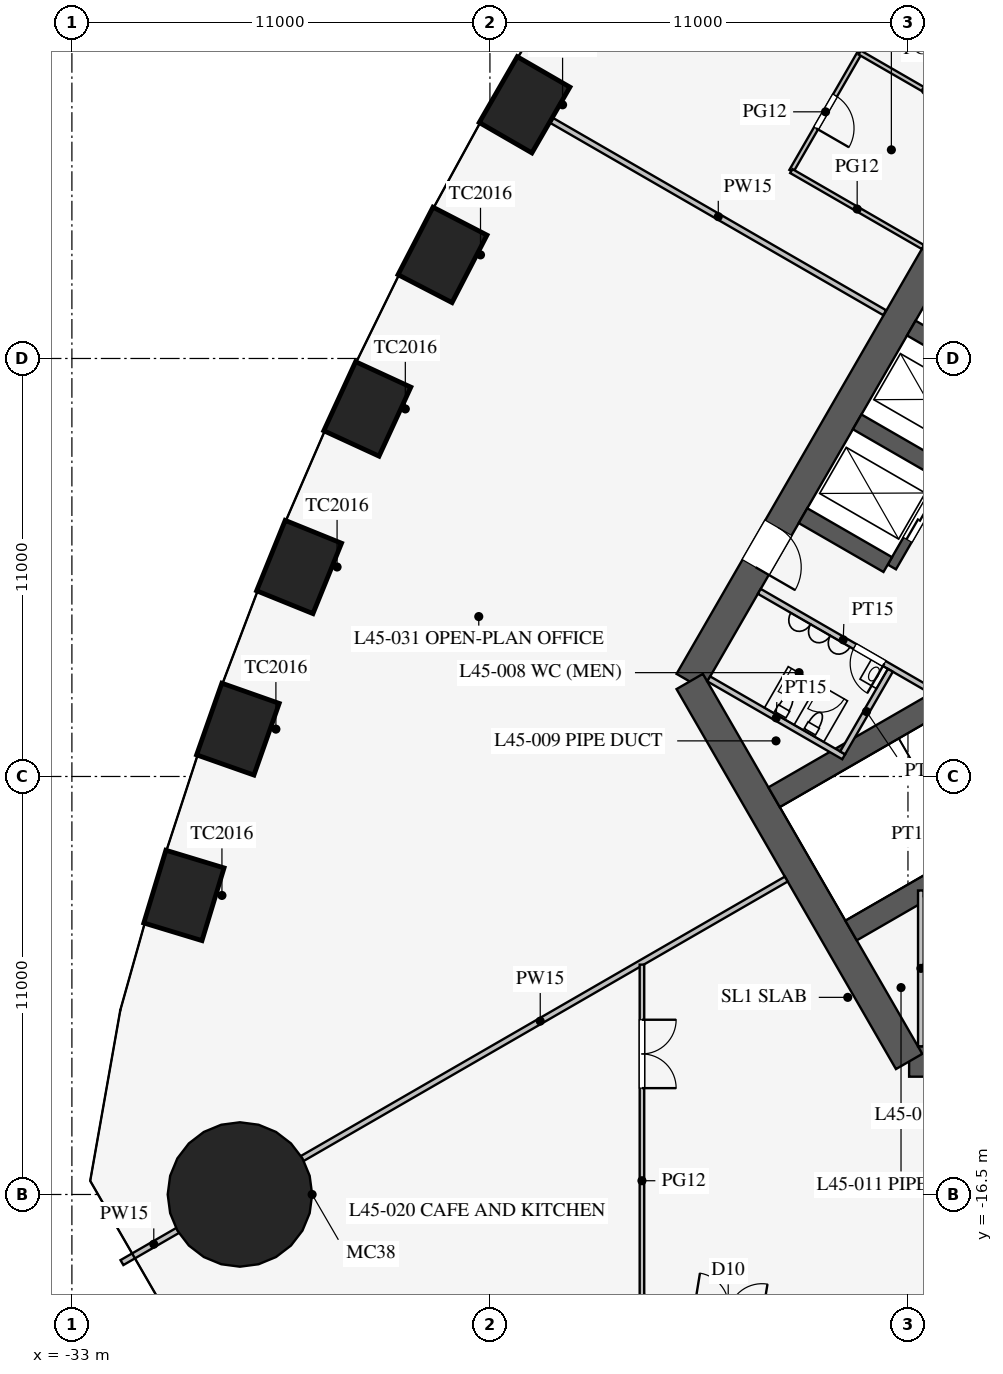
"""IFC4 building model, lengths in metres.
Left out: names, types, materials, properties, quantities, classifications, styles, units other than length and angle.
Written with IfcOpenShell. Run it as: python <this file> out.ifc"""

import sys

from ifc_helpers import new_model, si_unit, direction, frame, frame_2d, origin, origin_2d, place, context, subcontext, project, spatial, rectangle, circle, extrude, element, fill, save


model = new_model("IFC4")
c1 = context("Model", 3, precision=1e-05, world=origin(), true_north=direction((0.0, 1.0)))
c2 = subcontext(c1, "Body", "Model", "MODEL_VIEW")
j1 = project(units=[si_unit("LENGTHUNIT", "METRE"), si_unit("PLANEANGLEUNIT", "RADIAN")], contexts=[c1])
p1 = place(None, origin())
s1 = spatial("IfcSite", under=j1, at=p1, CompositionType="ELEMENT")
p2 = place(p1, origin())
s2 = spatial("IfcBuilding", under=s1, at=p2, CompositionType="ELEMENT")
p3 = place(p2, frame((0.0, 0.0, 198.1)))
s3 = spatial("IfcBuildingStorey", under=s2, at=p3, CompositionType="ELEMENT", Elevation=198.1)
for number, where, z_axis, x_axis in (
    (1, (-21.088, 12.175, 0.0), (0.0, 0.0, 1.0), (-0.5, -0.866, 0.0)),
    (2, (-23.248, 8.226, 0.0), (0.0, 0.0, 1.0), (-0.46, -0.888, 0.0)),
    (3, (-25.227, 4.172, 0.0), (0.0, 0.0, 1.0), (-0.418, -0.908, 0.0)),
    (4, (-27.022, 0.013, 0.0), (0.0, 0.0, 1.0), (-0.376, -0.927, 0.0)),
    (5, (-28.632, -4.254, 0.0), (0.0, 0.0, 1.0), (-0.332, -0.943, 0.0)),
    (6, (-30.052, -8.63, 0.0), (0.0, 0.0, 1.0), (-0.29, -0.957, 0.0)),
):
    element("IfcColumn", number, at=place(p3, frame(where, z_axis=z_axis, x_axis=x_axis)), inside=s3, PredefinedType="COLUMN", context=c2, shape_type="SweptSolid", body=[
        extrude(rectangle(XDim=2.0, YDim=1.6, at=origin_2d()), origin(), (0.0, 0.0, 1.0), 4.2),
    ])
p4 = place(p3, frame((-28.579, -16.5, 0.0), z_axis=(0.0, 0.0, 1.0), x_axis=(1.0, 0.0, 0.0)))
e7 = element("IfcColumn", 7, at=p4, inside=s3, PredefinedType="COLUMN", context=c2, shape_type="SweptSolid", body=[
    extrude(circle(Radius=1.9, at=origin_2d()), origin(), (0.0, 0.0, 1.0), 4.2),
])
p5 = place(p3, frame((-10.97, -13.0, 0.0), z_axis=(0.0, 0.0, 1.0), x_axis=(1.0, 0.0, 0.0)))
e8 = element("IfcWall", 8, at=p5, inside=s3, PredefinedType="SHEAR", context=c2, shape_type="SweptSolid", body=[
    extrude(rectangle(XDim=21.939, YDim=0.8, at=frame_2d((10.97, 0.0))), origin(), (0.0, 0.0, 1.0), 4.2),
])
p6 = place(p5, frame((17.27, 0.0, 0.0)))
e9 = element("IfcOpeningElement", 9, at=p6, cuts=e8, PredefinedType="OPENING", context=c2, shape_type="SweptSolid", body=[
    extrude(rectangle(XDim=1.2, YDim=2.1, at=frame_2d((0.6, 1.05))), frame((0.0, 0.41, 0.0), z_axis=(0.0, -1.0, 0.0), x_axis=(1.0, 0.0, 0.0)), (0.0, 0.0, 1.0), 0.82),
])
p7 = place(p5, frame((3.47, 0.0, 0.0)))
e10 = element("IfcOpeningElement", 10, at=p7, cuts=e8, PredefinedType="OPENING", context=c2, shape_type="SweptSolid", body=[
    extrude(rectangle(XDim=1.2, YDim=2.1, at=frame_2d((0.6, 1.05))), frame((0.0, 0.41, 0.0), z_axis=(0.0, -1.0, 0.0), x_axis=(1.0, 0.0, 0.0)), (0.0, 0.0, 1.0), 0.82),
])
p8 = place(p3, frame((-5.773, 16.0, 0.0), z_axis=(0.0, 0.0, 1.0), x_axis=(-0.500002442456, -0.866023993627, 0.0)))
e11 = element("IfcWall", 11, at=p8, inside=s3, PredefinedType="SHEAR", context=c2, shape_type="SweptSolid", body=[
    extrude(rectangle(XDim=21.939, YDim=0.8, at=frame_2d((10.97, 0.0))), origin(), (0.0, 0.0, 1.0), 4.2),
])
p9 = place(p8, frame((17.27, 0.0, 0.0)))
e12 = element("IfcOpeningElement", 12, at=p9, cuts=e11, PredefinedType="OPENING", context=c2, shape_type="SweptSolid", body=[
    extrude(rectangle(XDim=1.2, YDim=2.1, at=frame_2d((0.6, 1.05))), frame((0.0, 0.41, 0.0), z_axis=(0.0, -1.0, 0.0), x_axis=(1.0, 0.0, 0.0)), (0.0, 0.0, 1.0), 0.82),
])
p10 = place(p8, frame((3.47, 0.0, 0.0)))
e13 = element("IfcOpeningElement", 13, at=p10, cuts=e11, PredefinedType="OPENING", context=c2, shape_type="SweptSolid", body=[
    extrude(rectangle(XDim=1.2, YDim=2.1, at=frame_2d((0.6, 1.05))), frame((0.0, 0.41, 0.0), z_axis=(0.0, -1.0, 0.0), x_axis=(1.0, 0.0, 0.0)), (0.0, 0.0, 1.0), 0.82),
])
p11 = place(p3, frame((-16.743, -3.0, 0.0), z_axis=(0.0, 0.0, 1.0), x_axis=(0.499995765644, -0.866027848477, 0.0)))
e14 = element("IfcWall", 14, at=p11, inside=s3, PredefinedType="SHEAR", context=c2, shape_type="SweptSolid", body=[
    extrude(rectangle(XDim=11.547, YDim=0.8, at=frame_2d((5.773, 0.0))), origin(), (0.0, 0.0, 1.0), 4.2),
])
p12 = place(p3, frame((-5.724, 9.886, 0.0), z_axis=(0.0, 0.0, 1.0), x_axis=(-0.500001763848, -0.866024385424, 0.0)))
e15 = element("IfcWall", 15, at=p12, inside=s3, PredefinedType="SHEAR", context=c2, shape_type="SweptSolid", body=[
    extrude(rectangle(XDim=11.4, YDim=0.25, at=frame_2d((5.7, 0.0))), origin(), (0.0, 0.0, 1.0), 4.2),
])
p13 = place(p12, frame((6.525, 0.0, 0.0)))
e16 = element("IfcOpeningElement", 16, at=p13, cuts=e15, PredefinedType="OPENING", context=c2, shape_type="SweptSolid", body=[
    extrude(rectangle(XDim=1.2, YDim=2.2, at=frame_2d((0.6, 1.1))), frame((0.0, 0.135, 0.0), z_axis=(0.0, -1.0, 0.0), x_axis=(1.0, 0.0, 0.0)), (0.0, 0.0, 1.0), 0.27),
])
p14 = place(p12, frame((9.375, 0.0, 0.0)))
e17 = element("IfcOpeningElement", 17, at=p14, cuts=e15, PredefinedType="OPENING", context=c2, shape_type="SweptSolid", body=[
    extrude(rectangle(XDim=1.2, YDim=2.2, at=frame_2d((0.6, 1.1))), frame((0.0, 0.135, 0.0), z_axis=(0.0, -1.0, 0.0), x_axis=(1.0, 0.0, 0.0)), (0.0, 0.0, 1.0), 0.27),
])
for number, where, z_axis, x_axis in (
    (18, (-8.682, 5.012, 0.0), (0.0, 0.0, 1.0), (-0.866, 0.5, 0.0)),
    (19, (-10.107, 2.544, 0.0), (0.0, 0.0, 1.0), (-0.866, 0.5, 0.0)),
    (20, (-11.532, 0.076, 0.0), (0.0, 0.0, 1.0), (-0.866, 0.5, 0.0)),
):
    element("IfcWall", number, at=place(p3, frame(where, z_axis=z_axis, x_axis=x_axis)), inside=s3, PredefinedType="SHEAR", context=c2, shape_type="SweptSolid", body=[
        extrude(rectangle(XDim=2.575, YDim=0.45, at=frame_2d((1.288, 0.0))), origin(), (0.0, 0.0, 1.0), 4.2),
    ])
for number, where, z_axis, x_axis in (
    (21, (-6.663, -1.509, 0.0), (0.0, 0.0, 1.0), (-0.866, -0.5, 0.0)),
    (22, (-4.638, -5.016, 0.0), (0.0, 0.0, 1.0), (-0.866, -0.5, 0.0)),
):
    element("IfcWall", number, at=place(p3, frame(where, z_axis=z_axis, x_axis=x_axis)), inside=s3, PredefinedType="SHEAR", context=c2, shape_type="SweptSolid", body=[
        extrude(rectangle(XDim=9.075, YDim=0.6, at=frame_2d((4.538, 0.0))), origin(), (0.0, 0.0, 1.0), 4.2),
    ])
p15 = place(p3, frame((-10.495, -3.178, 0.0), z_axis=(0.0, 0.0, 1.0), x_axis=(-0.86602216432, 0.500005610874, 0.0)))
e23 = element("IfcWall", 23, at=p15, inside=s3, PredefinedType="PARTITIONING", context=c2, shape_type="SweptSolid", body=[
    extrude(rectangle(XDim=5.1, YDim=0.15, at=frame_2d((2.55, 0.0))), origin(), (0.0, 0.0, 1.0), 4.0),
])
p16 = place(p15, frame((1.3, 0.0, 0.0)))
e24 = element("IfcOpeningElement", 24, at=p16, cuts=e23, PredefinedType="OPENING", context=c2, shape_type="SweptSolid", body=[
    extrude(rectangle(XDim=0.9, YDim=2.1, at=frame_2d((0.45, 1.05))), frame((0.0, 0.085, 0.0), z_axis=(0.0, -1.0, 0.0), x_axis=(1.0, 0.0, 0.0)), (0.0, 0.0, 1.0), 0.17),
])
p17 = place(p3, frame((-12.691, -4.982, 0.0), z_axis=(0.0, 0.0, 1.0), x_axis=(-0.8660249478, 0.500000789788, 0.0)))
e25 = element("IfcWall", 25, at=p17, inside=s3, PredefinedType="PARTITIONING", context=c2, shape_type="SweptSolid", body=[
    extrude(rectangle(XDim=4.1, YDim=0.15, at=frame_2d((2.05, 0.0))), origin(), (0.0, 0.0, 1.0), 4.0),
])
p18 = place(p3, frame((-11.464, -2.706, 0.0), z_axis=(0.0, 0.0, 1.0), x_axis=(-0.50001992892, -0.866013897511, 0.0)))
e26 = element("IfcWall", 26, at=p18, inside=s3, PredefinedType="PARTITIONING", context=c2, shape_type="SweptSolid", body=[
    extrude(rectangle(XDim=2.51, YDim=0.15, at=frame_2d((1.255, 0.0))), origin(), (0.0, 0.0, 1.0), 4.0),
])
p19 = place(p3, frame((-10.66, -8.5, 0.0), z_axis=(0.0, 0.0, 1.0), x_axis=(0.0, -1.0, 0.0)))
e27 = element("IfcWall", 27, at=p19, inside=s3, PredefinedType="PARTITIONING", context=c2, shape_type="SweptSolid", body=[
    extrude(rectangle(XDim=4.1, YDim=0.15, at=frame_2d((2.05, 0.0))), origin(), (0.0, 0.0, 1.0), 4.0),
])
p20 = place(p3, frame((-14.203, -8.2, 0.0), z_axis=(0.0, 0.0, 1.0), x_axis=(-0.866021600284, -0.500006587798, 0.0)))
e28 = element("IfcWall", 28, at=p20, inside=s3, PredefinedType="PARTITIONING", context=c2, shape_type="SweptSolid", body=[
    extrude(rectangle(XDim=14.95, YDim=0.15, at=frame_2d((7.475, 0.0))), origin(), (0.0, 0.0, 1.0), 2.4),
])
p21 = place(p3, frame((-30.008, -17.325, 0.0), z_axis=(0.0, 0.0, 1.0), x_axis=(-0.866013246922, -0.500021055713, 0.0)))
e29 = element("IfcWall", 29, at=p21, inside=s3, PredefinedType="PARTITIONING", context=c2, shape_type="SweptSolid", body=[
    extrude(rectangle(XDim=1.935, YDim=0.15, at=frame_2d((0.967, 0.0))), origin(), (0.0, 0.0, 1.0), 2.4),
])
p22 = place(p3, frame((-18.0, -10.451, 0.0), z_axis=(0.0, 0.0, 1.0), x_axis=(0.0, -1.0, 0.0)))
e30 = element("IfcWall", 30, at=p22, inside=s3, PredefinedType="PARTITIONING", context=c2, shape_type="SweptSolid", body=[
    extrude(rectangle(XDim=11.374, YDim=0.12, at=frame_2d((5.687, 0.0))), origin(), (0.0, 0.0, 1.0), 2.8),
])
p23 = place(p22, frame((1.45, 0.0, 0.15)))
e31 = element("IfcOpeningElement", 31, at=p23, cuts=e30, PredefinedType="OPENING", context=c2, shape_type="SweptSolid", body=[
    extrude(rectangle(XDim=1.8, YDim=2.1, at=frame_2d((0.9, 1.05))), frame((0.0, 0.07, 0.0), z_axis=(0.0, -1.0, 0.0), x_axis=(1.0, 0.0, 0.0)), (0.0, 0.0, 1.0), 0.14),
])
p24 = place(p3, frame((-11.613, 6.705, 0.0), z_axis=(0.0, 0.0, 1.0), x_axis=(-0.866032382055, 0.499987913086, 0.0)))
e32 = element("IfcWall", 32, at=p24, inside=s3, PredefinedType="PARTITIONING", context=c2, shape_type="SweptSolid", body=[
    extrude(rectangle(XDim=10.111, YDim=0.15, at=frame_2d((5.055, 0.0))), origin(), (0.0, 0.0, 1.0), 2.992),
])
p25 = place(p3, frame((-12.269, 13.55, 0.0), z_axis=(0.0, 0.0, 1.0), x_axis=(-0.500012057535, -0.866018442252, 0.0)))
e33 = element("IfcWall", 33, at=p25, inside=s3, PredefinedType="PARTITIONING", context=c2, shape_type="SweptSolid", body=[
    extrude(rectangle(XDim=3.6, YDim=0.12, at=frame_2d((1.8, 0.0))), origin(), (0.0, 0.0, 1.0), 2.9),
])
p26 = place(p25, frame((1.3, 0.0, 0.15)))
e34 = element("IfcOpeningElement", 34, at=p26, cuts=e33, PredefinedType="OPENING", context=c2, shape_type="SweptSolid", body=[
    extrude(rectangle(XDim=1.0, YDim=2.1, at=frame_2d((0.5, 1.05))), frame((0.0, 0.07, 0.0), z_axis=(0.0, -1.0, 0.0), x_axis=(1.0, 0.0, 0.0)), (0.0, 0.0, 1.0), 0.14),
])
for number, where, z_axis, x_axis in (
    (35, (-10.605, 8.432, 0.0), (0.0, 0.0, 1.0), (-0.866, 0.5, 0.0)),
    (36, (-8.805, 11.55, 0.0), (0.0, 0.0, 1.0), (-0.866, 0.5, 0.0)),
):
    element("IfcWall", number, at=place(p3, frame(where, z_axis=z_axis, x_axis=x_axis)), inside=s3, PredefinedType="PARTITIONING", context=c2, shape_type="SweptSolid", body=[
        extrude(rectangle(XDim=4.0, YDim=0.12, at=frame_2d((2.0, 0.0))), origin(), (0.0, 0.0, 1.0), 2.9),
    ])
p27 = place(p16, origin())
e37 = element("IfcDoor", 37, at=p27, inside=s3, OperationType="SINGLE_SWING_LEFT", PredefinedType="DOOR", context=c2, shape_type="SweptSolid", body=[
    extrude(rectangle(XDim=0.9, YDim=2.1, at=frame_2d((0.45, 1.05))), frame((0.0, 0.025, 0.0), z_axis=(0.0, -1.0, 0.0), x_axis=(1.0, 0.0, 0.0)), (0.0, 0.0, 1.0), 0.05),
])
fill(e24, e37)
p28 = place(p9, origin())
e38 = element("IfcDoor", 38, at=p28, inside=s3, OperationType="SINGLE_SWING_RIGHT", PredefinedType="DOOR", context=c2, shape_type="SweptSolid", body=[
    extrude(rectangle(XDim=1.2, YDim=2.1, at=frame_2d((0.6, 1.05))), frame((0.0, 0.025, 0.0), z_axis=(0.0, -1.0, 0.0), x_axis=(1.0, 0.0, 0.0)), (0.0, 0.0, 1.0), 0.05),
])
fill(e12, e38)
p29 = place(p23, origin())
e39 = element("IfcDoor", 39, at=p29, inside=s3, OperationType="DOUBLE_DOOR_SINGLE_SWING", PredefinedType="DOOR", context=c2, shape_type="SweptSolid", body=[
    extrude(rectangle(XDim=1.8, YDim=2.1, at=frame_2d((0.9, 1.05))), frame((0.0, 0.025, 0.0), z_axis=(0.0, -1.0, 0.0), x_axis=(1.0, 0.0, 0.0)), (0.0, 0.0, 1.0), 0.05),
])
fill(e31, e39)
p30 = place(p26, origin())
e40 = element("IfcDoor", 40, at=p30, inside=s3, OperationType="SINGLE_SWING_RIGHT", PredefinedType="DOOR", context=c2, shape_type="SweptSolid", body=[
    extrude(rectangle(XDim=1.0, YDim=2.1, at=frame_2d((0.5, 1.05))), frame((0.0, 0.025, 0.0), z_axis=(0.0, -1.0, 0.0), x_axis=(1.0, 0.0, 0.0)), (0.0, 0.0, 1.0), 0.05),
])
fill(e34, e40)
p31 = place(p14, origin())
e41 = element("IfcDoor", 41, at=p31, inside=s3, OperationType="DOUBLE_DOOR_SLIDING", PredefinedType="DOOR", context=c2, shape_type="SweptSolid", body=[
    extrude(rectangle(XDim=1.2, YDim=2.2, at=frame_2d((0.6, 1.1))), frame((0.0, 0.025, 0.0), z_axis=(0.0, -1.0, 0.0), x_axis=(1.0, 0.0, 0.0)), (0.0, 0.0, 1.0), 0.05),
])
fill(e17, e41)
save(model, sys.argv[1])
